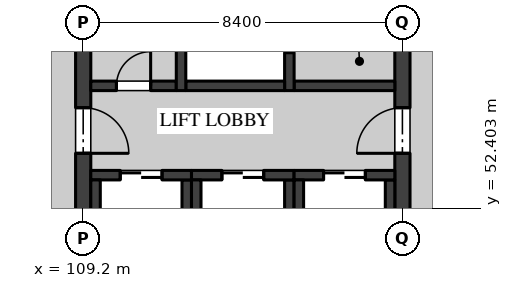
"""IFC4 building model, lengths in metres.
Left out: names, types, materials, properties, quantities, classifications, styles, units other than length and angle.
Written with IfcOpenShell. Run it as: python <this file> out.ifc"""

import sys

from ifc_helpers import new_model, si_unit, direction, frame, frame_2d, origin, place, context, subcontext, project, spatial, rectangle, extrude, element, fill, save


model = new_model("IFC4")
c1 = context("Model", 3, precision=1e-05, world=origin(), true_north=direction((0.0, 1.0)))
c2 = subcontext(c1, "Body", "Model", "MODEL_VIEW")
j1 = project(units=[si_unit("LENGTHUNIT", "METRE"), si_unit("PLANEANGLEUNIT", "RADIAN")], contexts=[c1])
p1 = place(None, origin())
s1 = spatial("IfcSite", under=j1, at=p1, CompositionType="ELEMENT")
p2 = place(p1, origin())
s2 = spatial("IfcBuilding", under=s1, at=p2, CompositionType="ELEMENT")
p3 = place(p2, frame((0.0, 0.0, 18.9)))
s3 = spatial("IfcBuildingStorey", under=s2, at=p3, CompositionType="ELEMENT", Elevation=18.9)
p4 = place(p3, frame((109.2, 50.6, 0.0), z_axis=(0.0, 0.0, 1.0), x_axis=(0.0, 1.0, 0.0)))
e1 = element("IfcWall", 1, at=p4, inside=s3, PredefinedType="SHEAR", context=c2, shape_type="SweptSolid", body=[
    extrude(rectangle(XDim=8.0, YDim=0.4, at=frame_2d((4.0, 0.0))), origin(), (0.0, 0.0, 1.0), 4.37),
])
p5 = place(p4, frame((3.25, 0.0, 0.0)))
e2 = element("IfcOpeningElement", 2, at=p5, cuts=e1, PredefinedType="OPENING", context=c2, shape_type="SweptSolid", body=[
    extrude(rectangle(XDim=1.2, YDim=2.1, at=frame_2d((0.6, 1.05))), frame((0.0, 0.21, 0.0), z_axis=(0.0, -1.0, 0.0), x_axis=(1.0, 0.0, 0.0)), (0.0, 0.0, 1.0), 0.42),
])
p6 = place(p3, frame((117.6, 50.6, 0.0), z_axis=(0.0, 0.0, 1.0), x_axis=(0.0, 1.0, 0.0)))
e3 = element("IfcWall", 3, at=p6, inside=s3, PredefinedType="SHEAR", context=c2, shape_type="SweptSolid", body=[
    extrude(rectangle(XDim=8.0, YDim=0.4, at=frame_2d((4.0, 0.0))), origin(), (0.0, 0.0, 1.0), 4.37),
])
p7 = place(p6, frame((3.25, 0.0, 0.0)))
e4 = element("IfcOpeningElement", 4, at=p7, cuts=e3, PredefinedType="OPENING", context=c2, shape_type="SweptSolid", body=[
    extrude(rectangle(XDim=1.2, YDim=2.1, at=frame_2d((0.6, 1.05))), frame((0.0, 0.21, 0.0), z_axis=(0.0, -1.0, 0.0), x_axis=(1.0, 0.0, 0.0)), (0.0, 0.0, 1.0), 0.42),
])
p8 = place(p6, frame((6.0, 0.0, 0.0)))
e5 = element("IfcOpeningElement", 5, at=p8, cuts=e3, PredefinedType="OPENING", context=c2, shape_type="SweptSolid", body=[
    extrude(rectangle(XDim=1.2, YDim=2.1, at=frame_2d((0.6, 1.05))), frame((0.0, 0.21, 0.0), z_axis=(0.0, -1.0, 0.0), x_axis=(1.0, 0.0, 0.0)), (0.0, 0.0, 1.0), 0.42),
])
p9 = place(p3, frame((109.4, 55.625, 0.0), z_axis=(0.0, 0.0, 1.0), x_axis=(1.0, 0.0, 0.0)))
e6 = element("IfcWall", 6, at=p9, inside=s3, PredefinedType="SOLIDWALL", context=c2, shape_type="SweptSolid", body=[
    extrude(rectangle(XDim=2.25, YDim=0.25, at=frame_2d((1.125, 0.0))), origin(), (0.0, 0.0, 1.0), 4.37),
])
p10 = place(p9, frame((0.675, 0.0, 0.0)))
e7 = element("IfcOpeningElement", 7, at=p10, cuts=e6, PredefinedType="OPENING", context=c2, shape_type="SweptSolid", body=[
    extrude(rectangle(XDim=0.9, YDim=2.1, at=frame_2d((0.45, 1.05))), frame((0.0, 0.135, 0.0), z_axis=(0.0, -1.0, 0.0), x_axis=(1.0, 0.0, 0.0)), (0.0, 0.0, 1.0), 0.27),
])
p11 = place(p3, frame((114.75, 55.625, 0.0), z_axis=(0.0, 0.0, 1.0), x_axis=(1.0, 0.0, 0.0)))
e8 = element("IfcWall", 8, at=p11, inside=s3, PredefinedType="SOLIDWALL", context=c2, shape_type="SweptSolid", body=[
    extrude(rectangle(XDim=2.65, YDim=0.25, at=frame_2d((1.325, 0.0))), origin(), (0.0, 0.0, 1.0), 4.37),
])
p12 = place(p3, frame((114.625, 55.5, 0.0), z_axis=(0.0, 0.0, 1.0), x_axis=(0.0, 1.0, 0.0)))
e9 = element("IfcWall", 9, at=p12, inside=s3, PredefinedType="SOLIDWALL", context=c2, shape_type="SweptSolid", body=[
    extrude(rectangle(XDim=3.1, YDim=0.25, at=frame_2d((1.55, 0.0))), origin(), (0.0, 0.0, 1.0), 4.37),
])
p13 = place(p12, frame((1.0, 0.0, 0.0)))
e10 = element("IfcOpeningElement", 10, at=p13, cuts=e9, PredefinedType="OPENING", context=c2, shape_type="SweptSolid", body=[
    extrude(rectangle(XDim=1.1, YDim=2.1, at=frame_2d((0.55, 1.05))), frame((0.0, 0.135, 0.0), z_axis=(0.0, -1.0, 0.0), x_axis=(1.0, 0.0, 0.0)), (0.0, 0.0, 1.0), 0.27),
])
p14 = place(p3, frame((111.9, 55.625, 0.0), z_axis=(0.0, 0.0, 1.0), x_axis=(1.0, 0.0, 0.0)))
e11 = element("IfcWall", 11, at=p14, inside=s3, PredefinedType="SOLIDWALL", context=c2, shape_type="SweptSolid", body=[
    extrude(rectangle(XDim=2.6, YDim=0.25, at=frame_2d((1.3, 0.0))), origin(), (0.0, 0.0, 1.0), 4.37),
])
p15 = place(p3, frame((111.775, 55.5, 0.0), z_axis=(0.0, 0.0, 1.0), x_axis=(0.0, 1.0, 0.0)))
e12 = element("IfcWall", 12, at=p15, inside=s3, PredefinedType="SOLIDWALL", context=c2, shape_type="SweptSolid", body=[
    extrude(rectangle(XDim=3.1, YDim=0.25, at=frame_2d((1.55, 0.0))), origin(), (0.0, 0.0, 1.0), 4.37),
])
p16 = place(p3, frame((111.925, 50.85, 0.0), z_axis=(0.0, 0.0, 1.0), x_axis=(0.0, 1.0, 0.0)))
e13 = element("IfcWall", 13, at=p16, inside=s3, PredefinedType="SOLIDWALL", context=c2, shape_type="SweptSolid", body=[
    extrude(rectangle(XDim=2.3, YDim=0.25, at=frame_2d((1.15, 0.0))), origin(), (0.0, 0.0, 1.0), 4.37),
])
p17 = place(p3, frame((109.4, 53.275, 0.0), z_axis=(0.0, 0.0, 1.0), x_axis=(1.0, 0.0, 0.0)))
e14 = element("IfcWall", 14, at=p17, inside=s3, PredefinedType="SOLIDWALL", context=c2, shape_type="SweptSolid", body=[
    extrude(rectangle(XDim=2.65, YDim=0.25, at=frame_2d((1.325, 0.0))), origin(), (0.0, 0.0, 1.0), 4.37),
])
p18 = place(p17, frame((0.775, 0.0, 0.0)))
e15 = element("IfcOpeningElement", 15, at=p18, cuts=e14, PredefinedType="OPENING", context=c2, shape_type="SweptSolid", body=[
    extrude(rectangle(XDim=1.1, YDim=2.1, at=frame_2d((0.55, 1.05))), frame((0.0, 0.135, 0.0), z_axis=(0.0, -1.0, 0.0), x_axis=(1.0, 0.0, 0.0)), (0.0, 0.0, 1.0), 0.27),
])
for number, where, z_axis, x_axis in (
    (16, (109.525, 50.85, 0.0), (0.0, 0.0, 1.0), (0.0, 1.0, 0.0)),
    (17, (114.625, 50.85, 0.0), (0.0, 0.0, 1.0), (0.0, 1.0, 0.0)),
):
    element("IfcWall", number, at=place(p3, frame(where, z_axis=z_axis, x_axis=x_axis)), inside=s3, PredefinedType="SOLIDWALL", context=c2, shape_type="SweptSolid", body=[
        extrude(rectangle(XDim=2.3, YDim=0.25, at=frame_2d((1.15, 0.0))), origin(), (0.0, 0.0, 1.0), 4.37),
    ])
p19 = place(p3, frame((112.05, 53.275, 0.0), z_axis=(0.0, 0.0, 1.0), x_axis=(1.0, 0.0, 0.0)))
e18 = element("IfcWall", 18, at=p19, inside=s3, PredefinedType="SOLIDWALL", context=c2, shape_type="SweptSolid", body=[
    extrude(rectangle(XDim=2.7, YDim=0.25, at=frame_2d((1.35, 0.0))), origin(), (0.0, 0.0, 1.0), 4.37),
])
p20 = place(p19, frame((0.8, 0.0, 0.0)))
e19 = element("IfcOpeningElement", 19, at=p20, cuts=e18, PredefinedType="OPENING", context=c2, shape_type="SweptSolid", body=[
    extrude(rectangle(XDim=1.1, YDim=2.1, at=frame_2d((0.55, 1.05))), frame((0.0, 0.135, 0.0), z_axis=(0.0, -1.0, 0.0), x_axis=(1.0, 0.0, 0.0)), (0.0, 0.0, 1.0), 0.27),
])
for number, where, z_axis, x_axis in (
    (20, (112.175, 50.85, 0.0), (0.0, 0.0, 1.0), (0.0, 1.0, 0.0)),
    (21, (117.275, 50.85, 0.0), (0.0, 0.0, 1.0), (0.0, 1.0, 0.0)),
):
    element("IfcWall", number, at=place(p3, frame(where, z_axis=z_axis, x_axis=x_axis)), inside=s3, PredefinedType="SOLIDWALL", context=c2, shape_type="SweptSolid", body=[
        extrude(rectangle(XDim=2.3, YDim=0.25, at=frame_2d((1.15, 0.0))), origin(), (0.0, 0.0, 1.0), 4.37),
    ])
p21 = place(p3, frame((114.75, 53.275, 0.0), z_axis=(0.0, 0.0, 1.0), x_axis=(1.0, 0.0, 0.0)))
e22 = element("IfcWall", 22, at=p21, inside=s3, PredefinedType="SOLIDWALL", context=c2, shape_type="SweptSolid", body=[
    extrude(rectangle(XDim=2.65, YDim=0.25, at=frame_2d((1.325, 0.0))), origin(), (0.0, 0.0, 1.0), 4.37),
])
p22 = place(p21, frame((0.775, 0.0, 0.0)))
e23 = element("IfcOpeningElement", 23, at=p22, cuts=e22, PredefinedType="OPENING", context=c2, shape_type="SweptSolid", body=[
    extrude(rectangle(XDim=1.1, YDim=2.1, at=frame_2d((0.55, 1.05))), frame((0.0, 0.135, 0.0), z_axis=(0.0, -1.0, 0.0), x_axis=(1.0, 0.0, 0.0)), (0.0, 0.0, 1.0), 0.27),
])
p23 = place(p3, frame((114.875, 50.85, 0.0), z_axis=(0.0, 0.0, 1.0), x_axis=(0.0, 1.0, 0.0)))
e24 = element("IfcWall", 24, at=p23, inside=s3, PredefinedType="SOLIDWALL", context=c2, shape_type="SweptSolid", body=[
    extrude(rectangle(XDim=2.3, YDim=0.25, at=frame_2d((1.15, 0.0))), origin(), (0.0, 0.0, 1.0), 4.37),
])
p24 = place(p5, frame((1.2, 0.0, 0.0), z_axis=(0.0, 0.0, 1.0), x_axis=(-1.0, 0.0, 0.0)))
e25 = element("IfcDoor", 25, at=p24, inside=s3, OperationType="SINGLE_SWING_LEFT", PredefinedType="DOOR", context=c2, shape_type="SweptSolid", body=[
    extrude(rectangle(XDim=1.2, YDim=2.1, at=frame_2d((0.6, 1.05))), frame((0.0, 0.035, 0.0), z_axis=(0.0, -1.0, 0.0), x_axis=(1.0, 0.0, 0.0)), (0.0, 0.0, 1.0), 0.07),
])
fill(e2, e25)
p25 = place(p7, origin())
e26 = element("IfcDoor", 26, at=p25, inside=s3, OperationType="SINGLE_SWING_RIGHT", PredefinedType="DOOR", context=c2, shape_type="SweptSolid", body=[
    extrude(rectangle(XDim=1.2, YDim=2.1, at=frame_2d((0.6, 1.05))), frame((0.0, 0.035, 0.0), z_axis=(0.0, -1.0, 0.0), x_axis=(1.0, 0.0, 0.0)), (0.0, 0.0, 1.0), 0.07),
])
fill(e4, e26)
p26 = place(p10, origin())
e27 = element("IfcDoor", 27, at=p26, inside=s3, OperationType="SINGLE_SWING_LEFT", PredefinedType="DOOR", context=c2, shape_type="SweptSolid", body=[
    extrude(rectangle(XDim=0.9, YDim=2.1, at=frame_2d((0.45, 1.05))), frame((0.0, 0.05, 0.0), z_axis=(0.0, -1.0, 0.0), x_axis=(1.0, 0.0, 0.0)), (0.0, 0.0, 1.0), 0.1),
])
fill(e7, e27)
p27 = place(p18, origin())
e28 = element("IfcDoor", 28, at=p27, inside=s3, OperationType="DOUBLE_DOOR_SLIDING", PredefinedType="DOOR", context=c2, shape_type="SweptSolid", body=[
    extrude(rectangle(XDim=1.1, YDim=2.1, at=frame_2d((0.55, 1.05))), frame((0.0, 0.04, 0.0), z_axis=(0.0, -1.0, 0.0), x_axis=(1.0, 0.0, 0.0)), (0.0, 0.0, 1.0), 0.08),
])
fill(e15, e28)
p28 = place(p20, origin())
e29 = element("IfcDoor", 29, at=p28, inside=s3, OperationType="DOUBLE_DOOR_SLIDING", PredefinedType="DOOR", context=c2, shape_type="SweptSolid", body=[
    extrude(rectangle(XDim=1.1, YDim=2.1, at=frame_2d((0.55, 1.05))), frame((0.0, 0.04, 0.0), z_axis=(0.0, -1.0, 0.0), x_axis=(1.0, 0.0, 0.0)), (0.0, 0.0, 1.0), 0.08),
])
fill(e19, e29)
p29 = place(p22, origin())
e30 = element("IfcDoor", 30, at=p29, inside=s3, OperationType="DOUBLE_DOOR_SLIDING", PredefinedType="DOOR", context=c2, shape_type="SweptSolid", body=[
    extrude(rectangle(XDim=1.1, YDim=2.1, at=frame_2d((0.55, 1.05))), frame((0.0, 0.04, 0.0), z_axis=(0.0, -1.0, 0.0), x_axis=(1.0, 0.0, 0.0)), (0.0, 0.0, 1.0), 0.08),
])
fill(e23, e30)
save(model, sys.argv[1])
